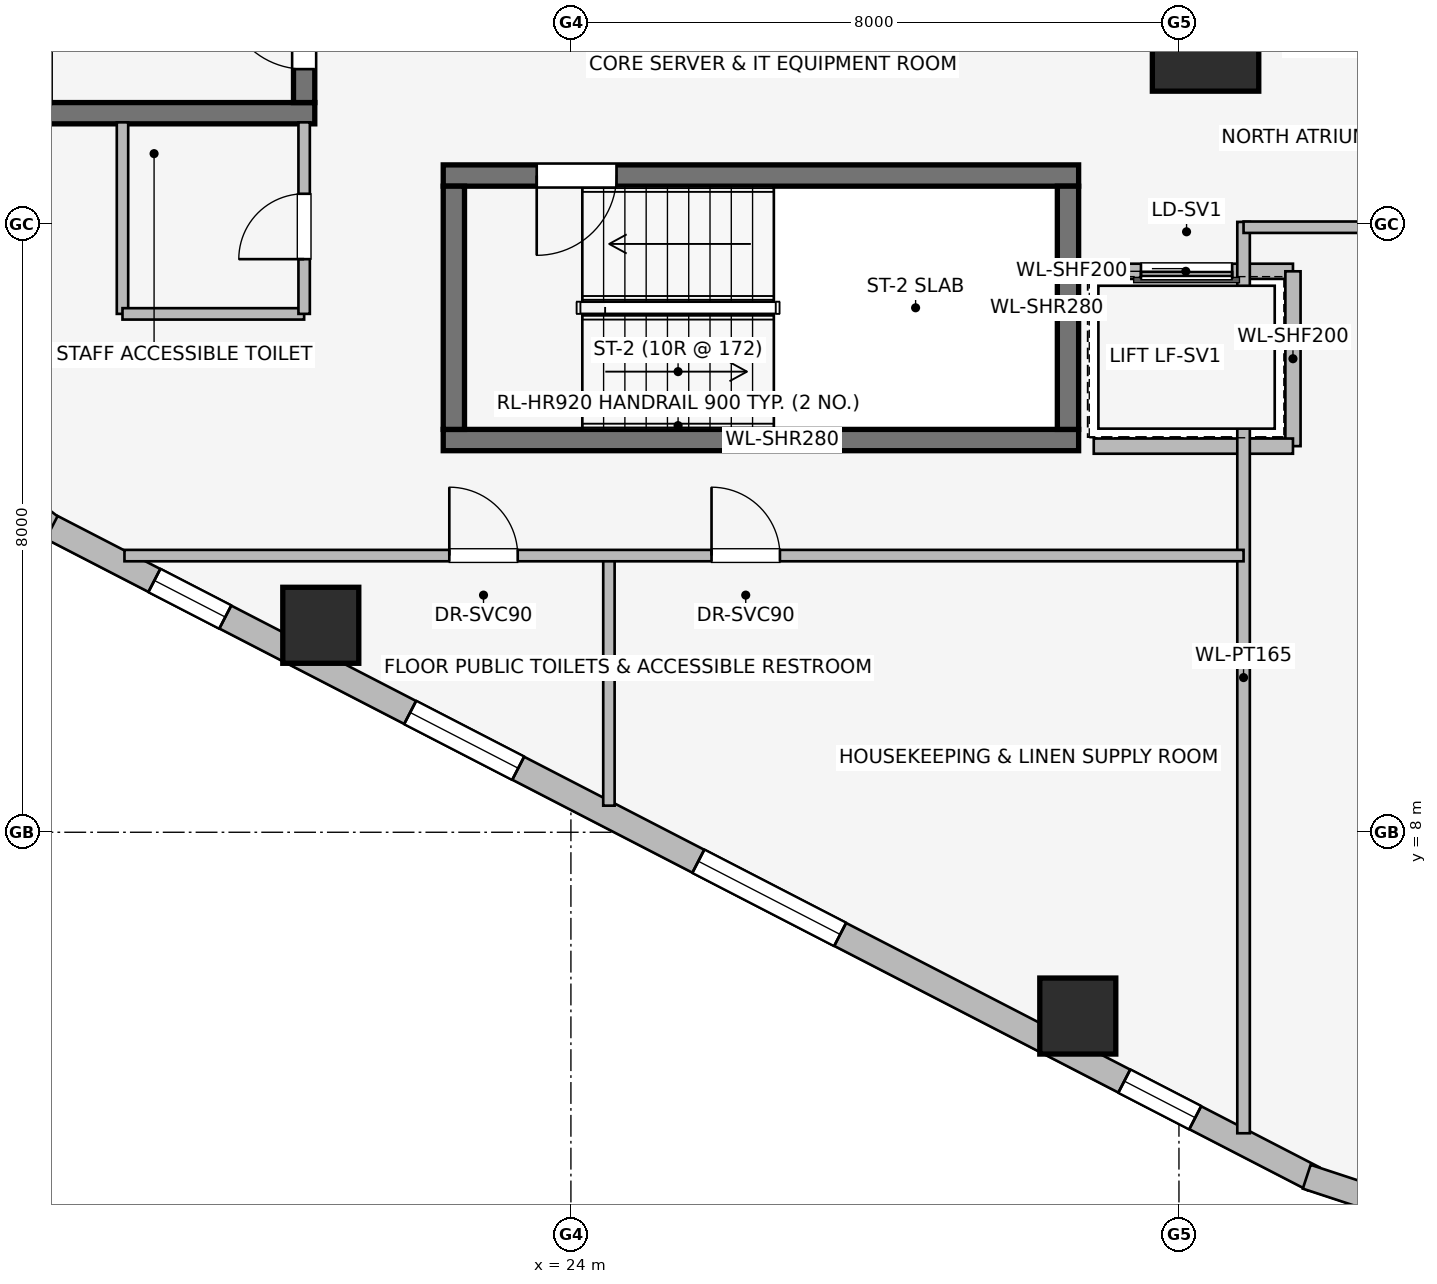
"""IFC4 building model, lengths in metres.
Left out: names, types, materials, properties, quantities, classifications, styles, units other than length and angle.
Written with IfcOpenShell. Run it as: python <this file> out.ifc"""

import sys

from ifc_helpers import new_model, si_unit, direction, frame, frame_2d, origin, origin_2d, place, context, subcontext, project, spatial, rectangle, extrude, element, fill, save


model = new_model("IFC4")
c1 = context("Model", 3, precision=1e-05, world=origin(), true_north=direction((0.0, 1.0)))
c2 = subcontext(c1, "Body", "Model", "MODEL_VIEW")
j1 = project(units=[si_unit("LENGTHUNIT", "METRE"), si_unit("PLANEANGLEUNIT", "RADIAN")], contexts=[c1])
p1 = place(None, origin())
s1 = spatial("IfcSite", under=j1, at=p1, CompositionType="ELEMENT")
p2 = place(p1, origin())
s2 = spatial("IfcBuilding", under=s1, at=p2, CompositionType="ELEMENT")
p3 = place(p2, frame((0.0, 0.0, 160.2)))
s3 = spatial("IfcBuildingStorey", under=s2, at=p3, CompositionType="ELEMENT", Elevation=160.2)
p4 = place(p3, frame((16.87, 17.46, 0.0), z_axis=(0.0, 0.0, 1.0), x_axis=(1.0, 0.0, 0.0)))
e1 = element("IfcWall", 1, at=p4, inside=s3, PredefinedType="SHEAR", context=c2, shape_type="SweptSolid", body=[
    extrude(rectangle(XDim=3.76, YDim=0.28, at=frame_2d((1.88, 0.0))), origin(), (0.0, 0.0, 1.0), 3.45),
])
p5 = place(p3, frame((20.49, 17.6, 0.0), z_axis=(0.0, 0.0, 1.0), x_axis=(0.0, 1.0, 0.0)))
e2 = element("IfcWall", 2, at=p5, inside=s3, PredefinedType="SHEAR", context=c2, shape_type="SweptSolid", body=[
    extrude(rectangle(XDim=7.8, YDim=0.28, at=frame_2d((3.9, 0.0))), origin(), (0.0, 0.0, 1.0), 3.45),
])
p6 = place(p5, frame((0.44, 0.0, 0.0)))
e3 = element("IfcOpeningElement", 3, at=p6, cuts=e2, PredefinedType="OPENING", context=c2, shape_type="SweptSolid", body=[
    extrude(rectangle(XDim=1.05, YDim=2.0, at=frame_2d((0.525, 1.0))), frame((0.0, 0.15, 0.0), z_axis=(0.0, -1.0, 0.0), x_axis=(1.0, 0.0, 0.0)), (0.0, 0.0, 1.0), 0.3),
])
p7 = place(p3, frame((22.32, 13.16, 0.0), z_axis=(0.0, 0.0, 1.0), x_axis=(1.0, 0.0, 0.0)))
e4 = element("IfcWall", 4, at=p7, inside=s3, PredefinedType="SHEAR", context=c2, shape_type="SweptSolid", body=[
    extrude(rectangle(XDim=8.36, YDim=0.28, at=frame_2d((4.18, 0.0))), origin(), (0.0, 0.0, 1.0), 3.45),
])
p8 = place(p3, frame((30.68, 16.64, 0.0), z_axis=(0.0, 0.0, 1.0), x_axis=(-1.0, 0.0, 0.0)))
e5 = element("IfcWall", 5, at=p8, inside=s3, PredefinedType="SHEAR", context=c2, shape_type="SweptSolid", body=[
    extrude(rectangle(XDim=8.36, YDim=0.28, at=frame_2d((4.18, 0.0))), origin(), (0.0, 0.0, 1.0), 3.45),
])
p9 = place(p8, frame((6.08, 0.0, 0.0)))
e6 = element("IfcOpeningElement", 6, at=p9, cuts=e5, PredefinedType="OPENING", context=c2, shape_type="SweptSolid", body=[
    extrude(rectangle(XDim=1.05, YDim=2.0, at=frame_2d((0.525, 1.0))), frame((0.0, 0.15, 0.0), z_axis=(0.0, -1.0, 0.0), x_axis=(1.0, 0.0, 0.0)), (0.0, 0.0, 1.0), 0.3),
])
for number, where, z_axis, x_axis in (
    (7, (22.46, 16.5, 0.0), (0.0, 0.0, 1.0), (0.0, -1.0, 0.0)),
    (8, (30.54, 13.3, 0.0), (0.0, 0.0, 1.0), (0.0, 1.0, 0.0)),
):
    element("IfcWall", number, at=place(p3, frame(where, z_axis=z_axis, x_axis=x_axis)), inside=s3, PredefinedType="SHEAR", context=c2, shape_type="SweptSolid", body=[
        extrude(rectangle(XDim=3.2, YDim=0.28, at=frame_2d((1.6, 0.0))), origin(), (0.0, 0.0, 1.0), 3.45),
    ])
p10 = place(p3, frame((32.35, 18.45, 0.0), z_axis=(0.0, 0.0, 1.0), x_axis=(1.0, 0.0, 0.0)))
e9 = element("IfcColumn", 9, at=p10, inside=s3, PredefinedType="COLUMN", context=c2, shape_type="SweptSolid", body=[
    extrude(rectangle(XDim=1.4, YDim=1.4, at=origin_2d()), origin(), (0.0, 0.0, 1.0), 3.45),
])
for number, where, z_axis, x_axis in (
    (10, (20.709, 10.723, 0.0), (0.0, 0.0, 1.0), (1.0, 0.0, 0.0)),
    (11, (30.669, 5.582, 0.0), (0.0, 0.0, 1.0), (1.0, 0.0, 0.0)),
):
    element("IfcColumn", number, at=place(p3, frame(where, z_axis=z_axis, x_axis=x_axis)), inside=s3, PredefinedType="COLUMN", context=c2, shape_type="SweptSolid", body=[
        extrude(rectangle(XDim=1.0, YDim=1.0, at=origin_2d()), origin(), (0.0, 0.0, 1.0), 3.45),
    ])
p11 = place(p3, frame((17.243, 11.95, 0.0), z_axis=(0.0, 0.0, 1.0), x_axis=(-0.790621329885, 0.612305408053, 0.0)))
e12 = element("IfcWall", 12, at=p11, inside=s3, PredefinedType="STANDARD", context=c2, shape_type="SweptSolid", body=[
    extrude(rectangle(XDim=1.676, YDim=0.33, at=frame_2d((0.838, 0.0))), origin(), (0.0, 0.0, 1.0), 3.03),
])
p12 = place(p3, frame((33.769, 3.442, 0.0), z_axis=(0.0, 0.0, 1.0), x_axis=(-0.888613612362, 0.458656568606, 0.0)))
e13 = element("IfcWall", 13, at=p12, inside=s3, PredefinedType="STANDARD", context=c2, shape_type="SweptSolid", body=[
    extrude(rectangle(XDim=18.681, YDim=0.34, at=frame_2d((9.34, 0.0))), origin(), (0.0, 0.0, 1.0), 3.03),
])
p13 = place(p12, frame((1.75, 0.0, 0.75)))
e14 = element("IfcOpeningElement", 14, at=p13, cuts=e13, PredefinedType="OPENING", context=c2, shape_type="SweptSolid", body=[
    extrude(rectangle(XDim=1.05, YDim=1.4, at=frame_2d((0.525, 0.7))), frame((0.0, 0.18, 0.0), z_axis=(0.0, -1.0, 0.0), x_axis=(1.0, 0.0, 0.0)), (0.0, 0.0, 1.0), 0.36),
])
p14 = place(p12, frame((7.007, 0.0, 0.75)))
e15 = element("IfcOpeningElement", 15, at=p14, cuts=e13, PredefinedType="OPENING", context=c2, shape_type="SweptSolid", body=[
    extrude(rectangle(XDim=2.1, YDim=1.5, at=frame_2d((1.05, 0.75))), frame((0.0, 0.18, 0.0), z_axis=(0.0, -1.0, 0.0), x_axis=(1.0, 0.0, 0.0)), (0.0, 0.0, 1.0), 0.36),
])
p15 = place(p12, frame((11.774, 0.0, 0.75)))
e16 = element("IfcOpeningElement", 16, at=p15, cuts=e13, PredefinedType="OPENING", context=c2, shape_type="SweptSolid", body=[
    extrude(rectangle(XDim=1.6, YDim=1.55, at=frame_2d((0.8, 0.775))), frame((0.0, 0.18, 0.0), z_axis=(0.0, -1.0, 0.0), x_axis=(1.0, 0.0, 0.0)), (0.0, 0.0, 1.0), 0.36),
])
p16 = place(p12, frame((16.111, 0.0, 0.75)))
e17 = element("IfcOpeningElement", 17, at=p16, cuts=e13, PredefinedType="OPENING", context=c2, shape_type="SweptSolid", body=[
    extrude(rectangle(XDim=1.05, YDim=1.4, at=frame_2d((0.525, 0.7))), frame((0.0, 0.18, 0.0), z_axis=(0.0, -1.0, 0.0), x_axis=(1.0, 0.0, 0.0)), (0.0, 0.0, 1.0), 0.36),
])
p17 = place(p3, frame((35.317, 2.93, 0.0), z_axis=(0.0, 0.0, 1.0), x_axis=(-0.949937416267, 0.312440242569, 0.0)))
e18 = element("IfcWall", 18, at=p17, inside=s3, PredefinedType="STANDARD", context=c2, shape_type="SweptSolid", body=[
    extrude(rectangle(XDim=1.722, YDim=0.33, at=frame_2d((0.861, 0.0))), origin(), (0.0, 0.0, 1.0), 3.03),
])
p18 = place(p3, frame((33.5, 15.38, 0.0), z_axis=(0.0, 0.0, 1.0), x_axis=(-1.0, 0.0, 0.0)))
e19 = element("IfcWall", 19, at=p18, inside=s3, PredefinedType="PARTITIONING", context=c2, shape_type="SweptSolid", body=[
    extrude(rectangle(XDim=2.82, YDim=0.2, at=frame_2d((1.41, 0.0))), origin(), (0.0, 0.0, 1.0), 3.03),
])
p19 = place(p18, frame((0.8, 0.0, 0.0)))
e20 = element("IfcOpeningElement", 20, at=p19, cuts=e19, PredefinedType="OPENING", context=c2, shape_type="SweptSolid", body=[
    extrude(rectangle(XDim=1.2, YDim=2.2, at=frame_2d((0.6, 1.1))), frame((0.0, 0.11, 0.0), z_axis=(0.0, -1.0, 0.0), x_axis=(1.0, 0.0, 0.0)), (0.0, 0.0, 1.0), 0.22),
])
p20 = place(p3, frame((33.5, 13.08, 0.0), z_axis=(0.0, 0.0, 1.0), x_axis=(0.0, 1.0, 0.0)))
e21 = element("IfcWall", 21, at=p20, inside=s3, PredefinedType="PARTITIONING", context=c2, shape_type="SweptSolid", body=[
    extrude(rectangle(XDim=2.3, YDim=0.2, at=frame_2d((1.15, 0.0))), origin(), (0.0, 0.0, 1.0), 3.03),
])
p21 = place(p3, frame((30.879, 13.08, 0.0), z_axis=(0.0, 0.0, 1.0), x_axis=(1.0, 0.0, 0.0)))
e22 = element("IfcWall", 22, at=p21, inside=s3, PredefinedType="PARTITIONING", context=c2, shape_type="SweptSolid", body=[
    extrude(rectangle(XDim=2.621, YDim=0.2, at=frame_2d((1.311, 0.0))), origin(), (0.0, 0.0, 1.0), 3.03),
])
p22 = place(p3, frame((18.1, 17.34, 0.0), z_axis=(0.0, 0.0, 1.0), x_axis=(0.0, -1.0, 0.0)))
e23 = element("IfcWall", 23, at=p22, inside=s3, PredefinedType="PARTITIONING", context=c2, shape_type="SweptSolid", body=[
    extrude(rectangle(XDim=2.52, YDim=0.15, at=frame_2d((1.26, 0.0))), origin(), (0.0, 0.0, 1.0), 3.03),
])
p23 = place(p3, frame((18.1, 14.82, 0.0), z_axis=(0.0, 0.0, 1.0), x_axis=(1.0, 0.0, 0.0)))
e24 = element("IfcWall", 24, at=p23, inside=s3, PredefinedType="PARTITIONING", context=c2, shape_type="SweptSolid", body=[
    extrude(rectangle(XDim=2.39, YDim=0.15, at=frame_2d((1.195, 0.0))), origin(), (0.0, 0.0, 1.0), 3.03),
])
p24 = place(p3, frame((20.49, 14.82, 0.0), z_axis=(0.0, 0.0, 1.0), x_axis=(0.0, 1.0, 0.0)))
e25 = element("IfcWall", 25, at=p24, inside=s3, PredefinedType="PARTITIONING", context=c2, shape_type="SweptSolid", body=[
    extrude(rectangle(XDim=2.52, YDim=0.15, at=frame_2d((1.26, 0.0))), origin(), (0.0, 0.0, 1.0), 3.03),
])
p25 = place(p24, frame((0.72, 0.0, 0.0)))
e26 = element("IfcOpeningElement", 26, at=p25, cuts=e25, PredefinedType="OPENING", context=c2, shape_type="SweptSolid", body=[
    extrude(rectangle(XDim=0.86, YDim=2.0, at=frame_2d((0.43, 1.0))), frame((0.0, 0.085, 0.0), z_axis=(0.0, -1.0, 0.0), x_axis=(1.0, 0.0, 0.0)), (0.0, 0.0, 1.0), 0.17),
])
p26 = place(p3, frame((32.85, 4.04, 0.0), z_axis=(0.0, 0.0, 1.0), x_axis=(0.0, 1.0, 0.0)))
e27 = element("IfcWall", 27, at=p26, inside=s3, PredefinedType="PARTITIONING", context=c2, shape_type="SweptSolid", body=[
    extrude(rectangle(XDim=11.99, YDim=0.165, at=frame_2d((5.995, 0.0))), origin(), (0.0, 0.0, 1.0), 3.03),
])
p27 = place(p3, frame((24.5, 8.35, 0.0), z_axis=(0.0, 0.0, 1.0), x_axis=(0.0, 1.0, 0.0)))
e28 = element("IfcWall", 28, at=p27, inside=s3, PredefinedType="PARTITIONING", context=c2, shape_type="SweptSolid", body=[
    extrude(rectangle(XDim=3.29, YDim=0.15, at=frame_2d((1.645, 0.0))), origin(), (0.0, 0.0, 1.0), 3.03),
])
p28 = place(p3, frame((18.126, 11.64, 0.0), z_axis=(0.0, 0.0, 1.0), x_axis=(1.0, 0.0, 0.0)))
e29 = element("IfcWall", 29, at=p28, inside=s3, PredefinedType="PARTITIONING", context=c2, shape_type="SweptSolid", body=[
    extrude(rectangle(XDim=14.724, YDim=0.15, at=frame_2d((7.362, 0.0))), origin(), (0.0, 0.0, 1.0), 3.03),
])
p29 = place(p28, frame((4.274, 0.0, 0.0)))
e30 = element("IfcOpeningElement", 30, at=p29, cuts=e29, PredefinedType="OPENING", context=c2, shape_type="SweptSolid", body=[
    extrude(rectangle(XDim=0.9, YDim=2.0, at=frame_2d((0.45, 1.0))), frame((0.0, 0.085, 0.0), z_axis=(0.0, -1.0, 0.0), x_axis=(1.0, 0.0, 0.0)), (0.0, 0.0, 1.0), 0.17),
])
p30 = place(p28, frame((7.724, 0.0, 0.0)))
e31 = element("IfcOpeningElement", 31, at=p30, cuts=e29, PredefinedType="OPENING", context=c2, shape_type="SweptSolid", body=[
    extrude(rectangle(XDim=0.9, YDim=2.0, at=frame_2d((0.45, 1.0))), frame((0.0, 0.085, 0.0), z_axis=(0.0, -1.0, 0.0), x_axis=(1.0, 0.0, 0.0)), (0.0, 0.0, 1.0), 0.17),
])
p31 = place(p3, frame((32.85, 15.96, 0.0), z_axis=(0.0, 0.0, 1.0), x_axis=(1.0, 0.0, 0.0)))
e32 = element("IfcWall", 32, at=p31, inside=s3, PredefinedType="PARTITIONING", context=c2, shape_type="SweptSolid", body=[
    extrude(rectangle(XDim=12.051, YDim=0.15, at=frame_2d((6.025, 0.0))), origin(), (0.0, 0.0, 1.0), 3.03),
])
p32 = place(p31, frame((5.546, 0.0, 0.0)))
e33 = element("IfcOpeningElement", 33, at=p32, cuts=e32, PredefinedType="OPENING", context=c2, shape_type="SweptSolid", body=[
    extrude(rectangle(XDim=0.96, YDim=2.0, at=frame_2d((0.48, 1.0))), frame((0.0, 0.085, 0.0), z_axis=(0.0, -1.0, 0.0), x_axis=(1.0, 0.0, 0.0)), (0.0, 0.0, 1.0), 0.17),
])
p33 = place(p13, origin())
e34 = element("IfcWindow", 34, at=p33, inside=s3, PartitioningType="SINGLE_PANEL", PredefinedType="WINDOW", context=c2, shape_type="SweptSolid", body=[
    extrude(rectangle(XDim=1.05, YDim=1.4, at=frame_2d((0.525, 0.7))), frame((0.0, 0.03, 0.0), z_axis=(0.0, -1.0, 0.0), x_axis=(1.0, 0.0, 0.0)), (0.0, 0.0, 1.0), 0.06),
])
fill(e14, e34)
p34 = place(p14, origin())
e35 = element("IfcWindow", 35, at=p34, inside=s3, PartitioningType="SINGLE_PANEL", PredefinedType="WINDOW", context=c2, shape_type="SweptSolid", body=[
    extrude(rectangle(XDim=2.1, YDim=1.5, at=frame_2d((1.05, 0.75))), frame((0.0, 0.03, 0.0), z_axis=(0.0, -1.0, 0.0), x_axis=(1.0, 0.0, 0.0)), (0.0, 0.0, 1.0), 0.06),
])
fill(e15, e35)
p35 = place(p15, origin())
e36 = element("IfcWindow", 36, at=p35, inside=s3, PartitioningType="SINGLE_PANEL", PredefinedType="WINDOW", context=c2, shape_type="SweptSolid", body=[
    extrude(rectangle(XDim=1.6, YDim=1.55, at=frame_2d((0.8, 0.775))), frame((0.0, 0.03, 0.0), z_axis=(0.0, -1.0, 0.0), x_axis=(1.0, 0.0, 0.0)), (0.0, 0.0, 1.0), 0.06),
])
fill(e16, e36)
p36 = place(p16, origin())
e37 = element("IfcWindow", 37, at=p36, inside=s3, PartitioningType="SINGLE_PANEL", PredefinedType="WINDOW", context=c2, shape_type="SweptSolid", body=[
    extrude(rectangle(XDim=1.05, YDim=1.4, at=frame_2d((0.525, 0.7))), frame((0.0, 0.03, 0.0), z_axis=(0.0, -1.0, 0.0), x_axis=(1.0, 0.0, 0.0)), (0.0, 0.0, 1.0), 0.06),
])
fill(e17, e37)
p37 = place(p6, origin())
e38 = element("IfcDoor", 38, at=p37, inside=s3, OperationType="SINGLE_SWING_RIGHT", PredefinedType="DOOR", context=c2, shape_type="SweptSolid", body=[
    extrude(rectangle(XDim=1.05, YDim=2.0, at=frame_2d((0.525, 1.0))), frame((0.0, 0.025, 0.0), z_axis=(0.0, -1.0, 0.0), x_axis=(1.0, 0.0, 0.0)), (0.0, 0.0, 1.0), 0.05),
])
fill(e3, e38)
p38 = place(p9, origin())
e39 = element("IfcDoor", 39, at=p38, inside=s3, OperationType="SINGLE_SWING_RIGHT", PredefinedType="DOOR", context=c2, shape_type="SweptSolid", body=[
    extrude(rectangle(XDim=1.05, YDim=2.0, at=frame_2d((0.525, 1.0))), frame((0.0, 0.025, 0.0), z_axis=(0.0, -1.0, 0.0), x_axis=(1.0, 0.0, 0.0)), (0.0, 0.0, 1.0), 0.05),
])
fill(e6, e39)
p39 = place(p19, origin())
e40 = element("IfcDoor", 40, at=p39, inside=s3, OperationType="SLIDING_TO_RIGHT", PredefinedType="DOOR", context=c2, shape_type="SweptSolid", body=[
    extrude(rectangle(XDim=1.2, YDim=2.2, at=frame_2d((0.6, 1.1))), frame((0.0, 0.025, 0.0), z_axis=(0.0, -1.0, 0.0), x_axis=(1.0, 0.0, 0.0)), (0.0, 0.0, 1.0), 0.05),
])
fill(e20, e40)
p40 = place(p25, origin())
e41 = element("IfcDoor", 41, at=p40, inside=s3, OperationType="SINGLE_SWING_LEFT", PredefinedType="DOOR", context=c2, shape_type="SweptSolid", body=[
    extrude(rectangle(XDim=0.86, YDim=2.0, at=frame_2d((0.43, 1.0))), frame((0.0, 0.025, 0.0), z_axis=(0.0, -1.0, 0.0), x_axis=(1.0, 0.0, 0.0)), (0.0, 0.0, 1.0), 0.05),
])
fill(e26, e41)
p41 = place(p29, origin())
e42 = element("IfcDoor", 42, at=p41, inside=s3, OperationType="SINGLE_SWING_LEFT", PredefinedType="DOOR", context=c2, shape_type="SweptSolid", body=[
    extrude(rectangle(XDim=0.9, YDim=2.0, at=frame_2d((0.45, 1.0))), frame((0.0, 0.025, 0.0), z_axis=(0.0, -1.0, 0.0), x_axis=(1.0, 0.0, 0.0)), (0.0, 0.0, 1.0), 0.05),
])
fill(e30, e42)
p42 = place(p30, origin())
e43 = element("IfcDoor", 43, at=p42, inside=s3, OperationType="SINGLE_SWING_LEFT", PredefinedType="DOOR", context=c2, shape_type="SweptSolid", body=[
    extrude(rectangle(XDim=0.9, YDim=2.0, at=frame_2d((0.45, 1.0))), frame((0.0, 0.025, 0.0), z_axis=(0.0, -1.0, 0.0), x_axis=(1.0, 0.0, 0.0)), (0.0, 0.0, 1.0), 0.05),
])
fill(e31, e43)
save(model, sys.argv[1])
